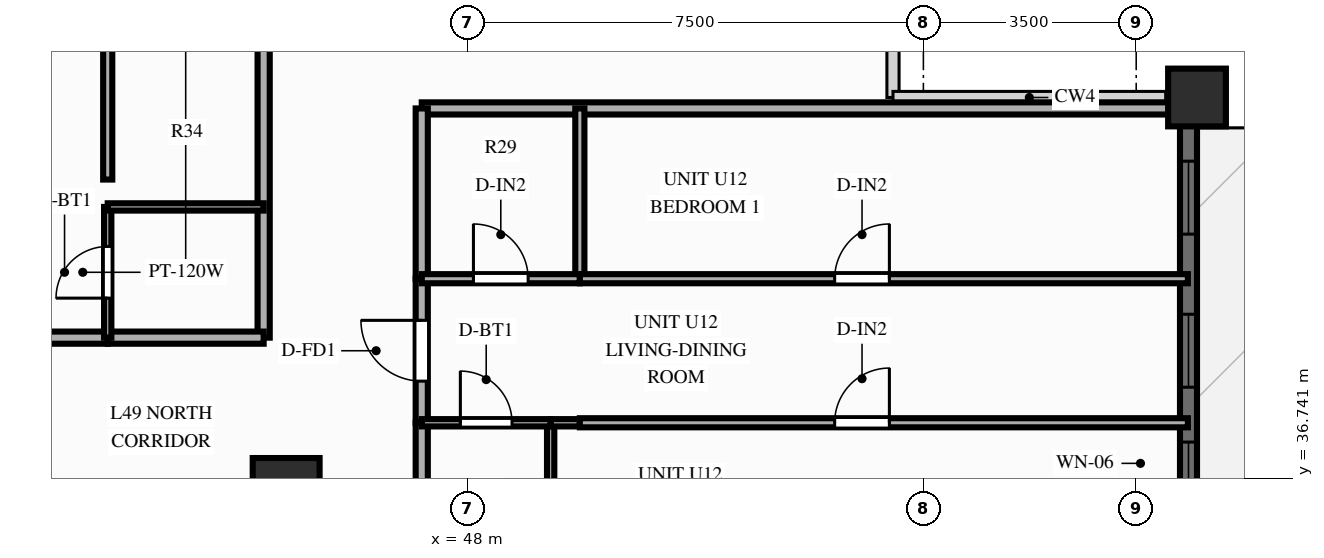
"""IFC4 building model, lengths in metres.
Left out: names, types, materials, properties, quantities, classifications, styles, units other than length and angle.
Written with IfcOpenShell. Run it as: python <this file> out.ifc"""

import sys

from ifc_helpers import new_model, si_unit, direction, frame, frame_2d, origin, origin_2d, place, context, subcontext, project, spatial, rectangle, extrude, source, transform, mapped, element, fill, save


model = new_model("IFC4")
c1 = context("Model", 3, precision=1e-05, world=origin(), true_north=direction((0.0, 1.0)))
c2 = subcontext(c1, "Body", "Model", "MODEL_VIEW")
j1 = project(units=[si_unit("LENGTHUNIT", "METRE"), si_unit("PLANEANGLEUNIT", "RADIAN")], contexts=[c1])
p1 = place(None, origin())
s1 = spatial("IfcSite", under=j1, at=p1, CompositionType="ELEMENT")
p2 = place(p1, origin())
s2 = spatial("IfcBuilding", under=s1, at=p2, CompositionType="ELEMENT")
p3 = place(p2, frame((0.0, 0.0, 156.1)))
s3 = spatial("IfcBuildingStorey", under=s2, at=p3, CompositionType="ELEMENT", Elevation=156.1)
m1 = source(origin(), c2, "Body", "SweptSolid", [
    extrude(rectangle(XDim=1.1, YDim=1.1, at=origin_2d()), origin(), (0.0, 0.0, 1.0), 3.0),
])
p4 = place(p3, frame((45.02, 36.52, 0.0), z_axis=(0.0, 0.0, 1.0), x_axis=(1.0, 0.0, 0.0)))
e1 = element("IfcColumn", 1, at=p4, inside=s3, PredefinedType="COLUMN", context=c2, shape_type="MappedRepresentation", body=[
    mapped(m1, transform((0.0, 0.0, 0.0), scale=1.0)),
])
m2 = source(origin(), c2, "Body", "SweptSolid", [
    extrude(rectangle(XDim=0.95, YDim=0.95, at=origin_2d()), origin(), (0.0, 0.0, 1.0), 3.0),
])
p5 = place(p3, frame((60.0, 43.0, 0.0), z_axis=(0.0, 0.0, 1.0), x_axis=(1.0, 0.0, 0.0)))
e2 = element("IfcColumn", 2, at=p5, inside=s3, PredefinedType="COLUMN", context=c2, shape_type="MappedRepresentation", body=[
    mapped(m2, transform((0.0, 0.0, 0.0), scale=1.0)),
])
p6 = place(p3, frame((59.86, 11.0, 0.0), z_axis=(0.0, 0.0, 1.0), x_axis=(0.0, 1.0, 0.0)))
e3 = element("IfcWall", 3, at=p6, inside=s3, PredefinedType="SOLIDWALL", context=c2, shape_type="SweptSolid", body=[
    extrude(rectangle(XDim=32.0, YDim=0.28, at=frame_2d((16.0, 0.0))), origin(), (0.0, 0.0, 1.0), 2.28),
])
p7 = place(p6, frame((0.748, 0.0, 0.25)))
e4 = element("IfcOpeningElement", 4, at=p7, cuts=e3, PredefinedType="OPENING", context=c2, shape_type="SweptSolid", body=[
    extrude(rectangle(XDim=1.2, YDim=1.5, at=frame_2d((0.6, 0.75))), frame((0.0, 0.152, 0.0), z_axis=(0.0, -1.0, 0.0), x_axis=(1.0, 0.0, 0.0)), (0.0, 0.0, 1.0), 0.304),
])
p8 = place(p6, frame((2.965, 0.0, 0.25)))
e5 = element("IfcOpeningElement", 5, at=p8, cuts=e3, PredefinedType="OPENING", context=c2, shape_type="SweptSolid", body=[
    extrude(rectangle(XDim=1.2, YDim=1.5, at=frame_2d((0.6, 0.75))), frame((0.0, 0.152, 0.0), z_axis=(0.0, -1.0, 0.0), x_axis=(1.0, 0.0, 0.0)), (0.0, 0.0, 1.0), 0.304),
])
p9 = place(p6, frame((5.117, 0.0, 0.25)))
e6 = element("IfcOpeningElement", 6, at=p9, cuts=e3, PredefinedType="OPENING", context=c2, shape_type="SweptSolid", body=[
    extrude(rectangle(XDim=1.2, YDim=1.5, at=frame_2d((0.6, 0.75))), frame((0.0, 0.152, 0.0), z_axis=(0.0, -1.0, 0.0), x_axis=(1.0, 0.0, 0.0)), (0.0, 0.0, 1.0), 0.304),
])
p10 = place(p6, frame((8.05, 0.0, 0.25)))
e7 = element("IfcOpeningElement", 7, at=p10, cuts=e3, PredefinedType="OPENING", context=c2, shape_type="SweptSolid", body=[
    extrude(rectangle(XDim=1.2, YDim=1.5, at=frame_2d((0.6, 0.75))), frame((0.0, 0.152, 0.0), z_axis=(0.0, -1.0, 0.0), x_axis=(1.0, 0.0, 0.0)), (0.0, 0.0, 1.0), 0.304),
])
p11 = place(p6, frame((10.335, 0.0, 0.25)))
e8 = element("IfcOpeningElement", 8, at=p11, cuts=e3, PredefinedType="OPENING", context=c2, shape_type="SweptSolid", body=[
    extrude(rectangle(XDim=1.2, YDim=1.5, at=frame_2d((0.6, 0.75))), frame((0.0, 0.152, 0.0), z_axis=(0.0, -1.0, 0.0), x_axis=(1.0, 0.0, 0.0)), (0.0, 0.0, 1.0), 0.304),
])
p12 = place(p6, frame((14.32, 0.0, 0.0), z_axis=(0.0, 0.0, 1.0), x_axis=(-1.0, 0.0, 0.0)))
e9 = element("IfcOpeningElement", 9, at=p12, cuts=e3, PredefinedType="OPENING", context=c2, shape_type="SweptSolid", body=[
    extrude(rectangle(XDim=1.6, YDim=2.15, at=frame_2d((0.8, 1.075))), frame((0.0, 0.152, 0.0), z_axis=(0.0, -1.0, 0.0), x_axis=(1.0, 0.0, 0.0)), (0.0, 0.0, 1.0), 0.304),
])
p13 = place(p6, frame((15.4, 0.0, 0.25)))
e10 = element("IfcOpeningElement", 10, at=p13, cuts=e3, PredefinedType="OPENING", context=c2, shape_type="SweptSolid", body=[
    extrude(rectangle(XDim=1.2, YDim=1.5, at=frame_2d((0.6, 0.75))), frame((0.0, 0.152, 0.0), z_axis=(0.0, -1.0, 0.0), x_axis=(1.0, 0.0, 0.0)), (0.0, 0.0, 1.0), 0.304),
])
p14 = place(p6, frame((17.58, 0.0, 0.25)))
e11 = element("IfcOpeningElement", 11, at=p14, cuts=e3, PredefinedType="OPENING", context=c2, shape_type="SweptSolid", body=[
    extrude(rectangle(XDim=1.2, YDim=1.5, at=frame_2d((0.6, 0.75))), frame((0.0, 0.152, 0.0), z_axis=(0.0, -1.0, 0.0), x_axis=(1.0, 0.0, 0.0)), (0.0, 0.0, 1.0), 0.304),
])
p15 = place(p6, frame((19.865, 0.0, 0.25)))
e12 = element("IfcOpeningElement", 12, at=p15, cuts=e3, PredefinedType="OPENING", context=c2, shape_type="SweptSolid", body=[
    extrude(rectangle(XDim=1.2, YDim=1.5, at=frame_2d((0.6, 0.75))), frame((0.0, 0.152, 0.0), z_axis=(0.0, -1.0, 0.0), x_axis=(1.0, 0.0, 0.0)), (0.0, 0.0, 1.0), 0.304),
])
p16 = place(p6, frame((22.45, 0.0, 0.25)))
e13 = element("IfcOpeningElement", 13, at=p16, cuts=e3, PredefinedType="OPENING", context=c2, shape_type="SweptSolid", body=[
    extrude(rectangle(XDim=1.2, YDim=1.5, at=frame_2d((0.6, 0.75))), frame((0.0, 0.152, 0.0), z_axis=(0.0, -1.0, 0.0), x_axis=(1.0, 0.0, 0.0)), (0.0, 0.0, 1.0), 0.304),
])
p17 = place(p6, frame((25.633, 0.0, 0.25)))
e14 = element("IfcOpeningElement", 14, at=p17, cuts=e3, PredefinedType="OPENING", context=c2, shape_type="SweptSolid", body=[
    extrude(rectangle(XDim=0.7, YDim=1.5, at=frame_2d((0.35, 0.75))), frame((0.0, 0.152, 0.0), z_axis=(0.0, -1.0, 0.0), x_axis=(1.0, 0.0, 0.0)), (0.0, 0.0, 1.0), 0.304),
])
p18 = place(p6, frame((27.235, 0.0, 0.25)))
e15 = element("IfcOpeningElement", 15, at=p18, cuts=e3, PredefinedType="OPENING", context=c2, shape_type="SweptSolid", body=[
    extrude(rectangle(XDim=1.2, YDim=1.5, at=frame_2d((0.6, 0.75))), frame((0.0, 0.152, 0.0), z_axis=(0.0, -1.0, 0.0), x_axis=(1.0, 0.0, 0.0)), (0.0, 0.0, 1.0), 0.304),
])
p19 = place(p6, frame((29.752, 0.0, 0.25)))
e16 = element("IfcOpeningElement", 16, at=p19, cuts=e3, PredefinedType="OPENING", context=c2, shape_type="SweptSolid", body=[
    extrude(rectangle(XDim=1.2, YDim=1.5, at=frame_2d((0.6, 0.75))), frame((0.0, 0.152, 0.0), z_axis=(0.0, -1.0, 0.0), x_axis=(1.0, 0.0, 0.0)), (0.0, 0.0, 1.0), 0.304),
])
p20 = place(p3, frame((44.65, 39.05, 0.0), z_axis=(0.0, 0.0, 1.0), x_axis=(0.0, 1.0, 0.0)))
e17 = element("IfcWall", 17, at=p20, inside=s3, PredefinedType="PARTITIONING", context=c2, shape_type="SweptSolid", body=[
    extrude(rectangle(XDim=8.8, YDim=0.2, at=frame_2d((4.4, 0.0))), origin(), (0.0, 0.0, 1.0), 2.34),
])
p21 = place(p3, frame((39.075, 39.05, 0.0), z_axis=(0.0, 0.0, 1.0), x_axis=(1.0, 0.0, 0.0)))
e18 = element("IfcWall", 18, at=p21, inside=s3, PredefinedType="PARTITIONING", context=c2, shape_type="SweptSolid", body=[
    extrude(rectangle(XDim=3.01, YDim=0.2, at=frame_2d((1.505, 0.0))), origin(), (0.0, 0.0, 1.0), 2.79),
])
p22 = place(p21, frame((1.005, 0.0, 0.0)))
e19 = element("IfcOpeningElement", 19, at=p22, cuts=e18, PredefinedType="OPENING", context=c2, shape_type="SweptSolid", body=[
    extrude(rectangle(XDim=1.0, YDim=2.15, at=frame_2d((0.5, 1.075))), frame((0.0, 0.112, 0.0), z_axis=(0.0, -1.0, 0.0), x_axis=(1.0, 0.0, 0.0)), (0.0, 0.0, 1.0), 0.224),
])
p23 = place(p3, frame((42.085, 39.05, 0.0), z_axis=(0.0, 0.0, 1.0), x_axis=(1.0, 0.0, 0.0)))
e20 = element("IfcWall", 20, at=p23, inside=s3, PredefinedType="PARTITIONING", context=c2, shape_type="SweptSolid", body=[
    extrude(rectangle(XDim=2.564, YDim=0.2, at=frame_2d((1.282, 0.0))), origin(), (0.0, 0.0, 1.0), 2.79),
])
p24 = place(p3, frame((42.085, 39.05, 0.0), z_axis=(0.0, 0.0, 1.0), x_axis=(0.0, 1.0, 0.0)))
e21 = element("IfcWall", 21, at=p24, inside=s3, PredefinedType="PARTITIONING", context=c2, shape_type="SweptSolid", body=[
    extrude(rectangle(XDim=2.15, YDim=0.12, at=frame_2d((1.075, 0.0))), origin(), (0.0, 0.0, 1.0), 2.79),
])
p25 = place(p24, frame((0.65, 0.0, 0.0)))
e22 = element("IfcOpeningElement", 22, at=p25, cuts=e21, PredefinedType="OPENING", context=c2, shape_type="SweptSolid", body=[
    extrude(rectangle(XDim=0.85, YDim=2.05, at=frame_2d((0.425, 1.025))), frame((0.0, 0.072, 0.0), z_axis=(0.0, -1.0, 0.0), x_axis=(1.0, 0.0, 0.0)), (0.0, 0.0, 1.0), 0.144),
])
p26 = place(p3, frame((42.085, 41.2, 0.0), z_axis=(0.0, 0.0, 1.0), x_axis=(1.0, 0.0, 0.0)))
e23 = element("IfcWall", 23, at=p26, inside=s3, PredefinedType="PARTITIONING", context=c2, shape_type="SweptSolid", body=[
    extrude(rectangle(XDim=2.564, YDim=0.12, at=frame_2d((1.282, 0.0))), origin(), (0.0, 0.0, 1.0), 2.79),
])
p27 = place(p3, frame((42.085, 41.65, 0.0), z_axis=(0.0, 0.0, 1.0), x_axis=(0.0, 1.0, 0.0)))
e24 = element("IfcWall", 24, at=p27, inside=s3, PredefinedType="PARTITIONING", context=c2, shape_type="SweptSolid", body=[
    extrude(rectangle(XDim=6.2, YDim=0.15, at=frame_2d((3.1, 0.0))), origin(), (0.0, 0.0, 1.0), 2.79),
])
p28 = place(p27, frame((2.449, 0.0, 0.0)))
e25 = element("IfcOpeningElement", 25, at=p28, cuts=e24, PredefinedType="OPENING", context=c2, shape_type="SweptSolid", body=[
    extrude(rectangle(XDim=0.9, YDim=2.1, at=frame_2d((0.45, 1.05))), frame((0.0, 0.087, 0.0), z_axis=(0.0, -1.0, 0.0), x_axis=(1.0, 0.0, 0.0)), (0.0, 0.0, 1.0), 0.174),
])
p29 = place(p3, frame((47.25, 42.82, 0.0), z_axis=(0.0, 0.0, 1.0), x_axis=(1.0, 0.0, 0.0)))
e26 = element("IfcWall", 26, at=p29, inside=s3, PredefinedType="PARTITIONING", context=c2, shape_type="SweptSolid", body=[
    extrude(rectangle(XDim=12.6, YDim=0.2, at=frame_2d((6.3, 0.0))), origin(), (0.0, 0.0, 1.0), 2.79),
])
p30 = place(p3, frame((47.25, 35.45, 0.0), z_axis=(0.0, 0.0, 1.0), x_axis=(0.0, 1.0, 0.0)))
e27 = element("IfcWall", 27, at=p30, inside=s3, PredefinedType="PARTITIONING", context=c2, shape_type="SweptSolid", body=[
    extrude(rectangle(XDim=2.2, YDim=0.2, at=frame_2d((1.1, 0.0))), origin(), (0.0, 0.0, 1.0), 2.79),
])
p31 = place(p3, frame((47.25, 37.65, 0.0), z_axis=(0.0, 0.0, 1.0), x_axis=(0.0, 1.0, 0.0)))
e28 = element("IfcWall", 28, at=p31, inside=s3, PredefinedType="PARTITIONING", context=c2, shape_type="SweptSolid", body=[
    extrude(rectangle(XDim=2.369, YDim=0.2, at=frame_2d((1.185, 0.0))), origin(), (0.0, 0.0, 1.0), 2.79),
])
p32 = place(p31, frame((0.685, 0.0, 0.0)))
e29 = element("IfcOpeningElement", 29, at=p32, cuts=e28, PredefinedType="OPENING", context=c2, shape_type="SweptSolid", body=[
    extrude(rectangle(XDim=1.0, YDim=2.15, at=frame_2d((0.5, 1.075))), frame((0.0, 0.112, 0.0), z_axis=(0.0, -1.0, 0.0), x_axis=(1.0, 0.0, 0.0)), (0.0, 0.0, 1.0), 0.224),
])
p33 = place(p3, frame((47.25, 40.019, 0.0), z_axis=(0.0, 0.0, 1.0), x_axis=(0.0, 1.0, 0.0)))
e30 = element("IfcWall", 30, at=p33, inside=s3, PredefinedType="PARTITIONING", context=c2, shape_type="SweptSolid", body=[
    extrude(rectangle(XDim=2.801, YDim=0.2, at=frame_2d((1.4, 0.0))), origin(), (0.0, 0.0, 1.0), 2.79),
])
p34 = place(p3, frame((49.37, 35.45, 0.0), z_axis=(0.0, 0.0, 1.0), x_axis=(0.0, 1.0, 0.0)))
e31 = element("IfcWall", 31, at=p34, inside=s3, PredefinedType="PARTITIONING", context=c2, shape_type="SweptSolid", body=[
    extrude(rectangle(XDim=2.2, YDim=0.12, at=frame_2d((1.1, 0.0))), origin(), (0.0, 0.0, 1.0), 2.79),
])
p35 = place(p3, frame((49.85, 40.019, 0.0), z_axis=(0.0, 0.0, 1.0), x_axis=(0.0, 1.0, 0.0)))
e32 = element("IfcWall", 32, at=p35, inside=s3, PredefinedType="PARTITIONING", context=c2, shape_type="SweptSolid", body=[
    extrude(rectangle(XDim=2.801, YDim=0.15, at=frame_2d((1.4, 0.0))), origin(), (0.0, 0.0, 1.0), 2.79),
])
p36 = place(p3, frame((47.25, 37.65, 0.0), z_axis=(0.0, 0.0, 1.0), x_axis=(1.0, 0.0, 0.0)))
e33 = element("IfcWall", 33, at=p36, inside=s3, PredefinedType="PARTITIONING", context=c2, shape_type="SweptSolid", body=[
    extrude(rectangle(XDim=2.12, YDim=0.12, at=frame_2d((1.06, 0.0))), origin(), (0.0, 0.0, 1.0), 2.79),
])
p37 = place(p36, frame((0.635, 0.0, 0.0)))
e34 = element("IfcOpeningElement", 34, at=p37, cuts=e33, PredefinedType="OPENING", context=c2, shape_type="SweptSolid", body=[
    extrude(rectangle(XDim=0.85, YDim=2.05, at=frame_2d((0.425, 1.025))), frame((0.0, 0.072, 0.0), z_axis=(0.0, -1.0, 0.0), x_axis=(1.0, 0.0, 0.0)), (0.0, 0.0, 1.0), 0.144),
])
p38 = place(p3, frame((49.37, 37.65, 0.0), z_axis=(0.0, 0.0, 1.0), x_axis=(1.0, 0.0, 0.0)))
e35 = element("IfcWall", 35, at=p38, inside=s3, PredefinedType="PARTITIONING", context=c2, shape_type="SweptSolid", body=[
    extrude(rectangle(XDim=0.48, YDim=0.12, at=frame_2d((0.24, 0.0))), origin(), (0.0, 0.0, 1.0), 2.79),
])
p39 = place(p3, frame((49.85, 37.65, 0.0), z_axis=(0.0, 0.0, 1.0), x_axis=(1.0, 0.0, 0.0)))
e36 = element("IfcWall", 36, at=p39, inside=s3, PredefinedType="PARTITIONING", context=c2, shape_type="SweptSolid", body=[
    extrude(rectangle(XDim=10.0, YDim=0.15, at=frame_2d((5.0, 0.0))), origin(), (0.0, 0.0, 1.0), 2.79),
])
p40 = place(p39, frame((4.191, 0.0, 0.0)))
e37 = element("IfcOpeningElement", 37, at=p40, cuts=e36, PredefinedType="OPENING", context=c2, shape_type="SweptSolid", body=[
    extrude(rectangle(XDim=0.9, YDim=2.1, at=frame_2d((0.45, 1.05))), frame((0.0, 0.087, 0.0), z_axis=(0.0, -1.0, 0.0), x_axis=(1.0, 0.0, 0.0)), (0.0, 0.0, 1.0), 0.174),
])
p41 = place(p3, frame((47.25, 40.019, 0.0), z_axis=(0.0, 0.0, 1.0), x_axis=(1.0, 0.0, 0.0)))
e38 = element("IfcWall", 38, at=p41, inside=s3, PredefinedType="PARTITIONING", context=c2, shape_type="SweptSolid", body=[
    extrude(rectangle(XDim=2.6, YDim=0.15, at=frame_2d((1.3, 0.0))), origin(), (0.0, 0.0, 1.0), 2.79),
])
p42 = place(p41, frame((0.85, 0.0, 0.0)))
e39 = element("IfcOpeningElement", 39, at=p42, cuts=e38, PredefinedType="OPENING", context=c2, shape_type="SweptSolid", body=[
    extrude(rectangle(XDim=0.9, YDim=2.1, at=frame_2d((0.45, 1.05))), frame((0.0, 0.087, 0.0), z_axis=(0.0, -1.0, 0.0), x_axis=(1.0, 0.0, 0.0)), (0.0, 0.0, 1.0), 0.174),
])
p43 = place(p3, frame((49.85, 40.019, 0.0), z_axis=(0.0, 0.0, 1.0), x_axis=(1.0, 0.0, 0.0)))
e40 = element("IfcWall", 40, at=p43, inside=s3, PredefinedType="PARTITIONING", context=c2, shape_type="SweptSolid", body=[
    extrude(rectangle(XDim=10.0, YDim=0.15, at=frame_2d((5.0, 0.0))), origin(), (0.0, 0.0, 1.0), 2.79),
])
p44 = place(p43, frame((4.191, 0.0, 0.0)))
e41 = element("IfcOpeningElement", 41, at=p44, cuts=e40, PredefinedType="OPENING", context=c2, shape_type="SweptSolid", body=[
    extrude(rectangle(XDim=0.9, YDim=2.1, at=frame_2d((0.45, 1.05))), frame((0.0, 0.087, 0.0), z_axis=(0.0, -1.0, 0.0), x_axis=(1.0, 0.0, 0.0)), (0.0, 0.0, 1.0), 0.174),
])
m3 = source(origin(), c2, "Body", "SweptSolid", [
    extrude(rectangle(XDim=0.7, YDim=1.5, at=frame_2d((0.35, 0.75))), frame((0.0, 0.03, 0.0), z_axis=(0.0, -1.0, 0.0), x_axis=(1.0, 0.0, 0.0)), (0.0, 0.0, 1.0), 0.06),
])
p45 = place(p17, origin())
e42 = element("IfcWindow", 42, at=p45, inside=s3, PartitioningType="SINGLE_PANEL", PredefinedType="WINDOW", context=c2, shape_type="MappedRepresentation", body=[
    mapped(m3, transform((0.0, 0.0, 0.0), scale=1.0)),
])
fill(e14, e42)
m4 = source(origin(), c2, "Body", "SweptSolid", [
    extrude(rectangle(XDim=1.2, YDim=1.5, at=frame_2d((0.6, 0.75))), frame((0.0, 0.03, 0.0), z_axis=(0.0, -1.0, 0.0), x_axis=(1.0, 0.0, 0.0)), (0.0, 0.0, 1.0), 0.06),
])
p46 = place(p18, origin())
e43 = element("IfcWindow", 43, at=p46, inside=s3, PartitioningType="SINGLE_PANEL", PredefinedType="WINDOW", context=c2, shape_type="MappedRepresentation", body=[
    mapped(m4, transform((0.0, 0.0, 0.0), scale=1.0)),
])
fill(e15, e43)
p47 = place(p19, origin())
e44 = element("IfcWindow", 44, at=p47, inside=s3, PartitioningType="SINGLE_PANEL", PredefinedType="WINDOW", context=c2, shape_type="MappedRepresentation", body=[
    mapped(m4, transform((0.0, 0.0, 0.0), scale=1.0)),
])
fill(e16, e44)
m5 = source(origin(), c2, "Body", "SweptSolid", [
    extrude(rectangle(XDim=0.85, YDim=2.05, at=frame_2d((0.425, 1.025))), frame((0.0, 0.025, 0.0), z_axis=(0.0, -1.0, 0.0), x_axis=(1.0, 0.0, 0.0)), (0.0, 0.0, 1.0), 0.05),
])
p48 = place(p25, origin())
e45 = element("IfcDoor", 45, at=p48, inside=s3, OperationType="SINGLE_SWING_LEFT", PredefinedType="DOOR", context=c2, shape_type="MappedRepresentation", body=[
    mapped(m5, transform((0.0, 0.0, 0.0), scale=1.0)),
])
fill(e22, e45)
m6 = source(origin(), c2, "Body", "SweptSolid", [
    extrude(rectangle(XDim=1.0, YDim=2.15, at=frame_2d((0.5, 1.075))), frame((0.0, 0.025, 0.0), z_axis=(0.0, -1.0, 0.0), x_axis=(1.0, 0.0, 0.0)), (0.0, 0.0, 1.0), 0.05),
])
p49 = place(p32, origin())
e46 = element("IfcDoor", 46, at=p49, inside=s3, OperationType="SINGLE_SWING_RIGHT", PredefinedType="DOOR", context=c2, shape_type="MappedRepresentation", body=[
    mapped(m6, transform((0.0, 0.0, 0.0), scale=1.0)),
])
fill(e29, e46)
p50 = place(p37, origin())
e47 = element("IfcDoor", 47, at=p50, inside=s3, OperationType="SINGLE_SWING_LEFT", PredefinedType="DOOR", context=c2, shape_type="MappedRepresentation", body=[
    mapped(m5, transform((0.0, 0.0, 0.0), scale=1.0)),
])
fill(e34, e47)
m7 = source(origin(), c2, "Body", "SweptSolid", [
    extrude(rectangle(XDim=0.9, YDim=2.1, at=frame_2d((0.45, 1.05))), frame((0.0, 0.025, 0.0), z_axis=(0.0, -1.0, 0.0), x_axis=(1.0, 0.0, 0.0)), (0.0, 0.0, 1.0), 0.05),
])
p51 = place(p40, origin())
e48 = element("IfcDoor", 48, at=p51, inside=s3, OperationType="SINGLE_SWING_RIGHT", PredefinedType="DOOR", context=c2, shape_type="MappedRepresentation", body=[
    mapped(m7, transform((0.0, 0.0, 0.0), scale=1.0)),
])
fill(e37, e48)
p52 = place(p42, origin())
e49 = element("IfcDoor", 49, at=p52, inside=s3, OperationType="SINGLE_SWING_LEFT", PredefinedType="DOOR", context=c2, shape_type="MappedRepresentation", body=[
    mapped(m7, transform((0.0, 0.0, 0.0), scale=1.0)),
])
fill(e39, e49)
p53 = place(p44, origin())
e50 = element("IfcDoor", 50, at=p53, inside=s3, OperationType="SINGLE_SWING_RIGHT", PredefinedType="DOOR", context=c2, shape_type="MappedRepresentation", body=[
    mapped(m7, transform((0.0, 0.0, 0.0), scale=1.0)),
])
fill(e41, e50)
save(model, sys.argv[1])
